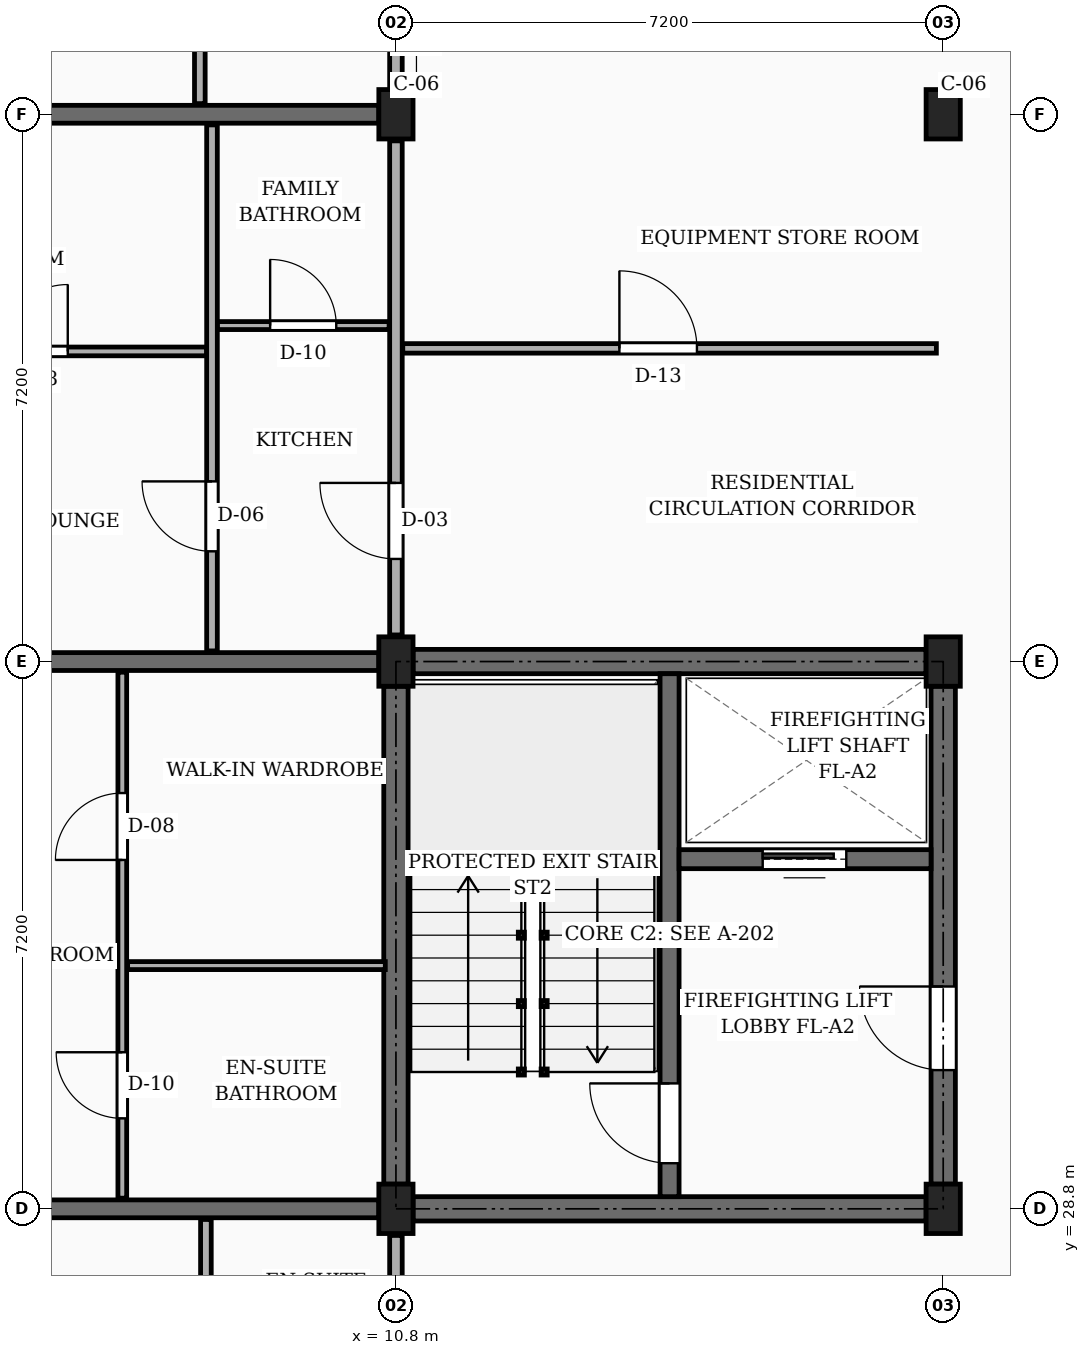
"""IFC4 building model, lengths in metres.
Left out: names, types, materials, properties, quantities, classifications, styles, units other than length and angle.
Written with IfcOpenShell. Run it as: python <this file> out.ifc"""

import sys

from ifc_helpers import new_model, si_unit, direction, frame, frame_2d, origin, origin_2d, place, context, subcontext, project, spatial, rectangle, extrude, element, fill, save


model = new_model("IFC4")
c1 = context("Model", 3, precision=1e-05, world=origin(), true_north=direction((0.0, 1.0)))
c2 = subcontext(c1, "Body", "Model", "MODEL_VIEW")
j1 = project(units=[si_unit("LENGTHUNIT", "METRE"), si_unit("PLANEANGLEUNIT", "RADIAN")], contexts=[c1])
p1 = place(None, origin())
s1 = spatial("IfcSite", under=j1, at=p1, CompositionType="ELEMENT")
p2 = place(p1, origin())
s2 = spatial("IfcBuilding", under=s1, at=p2, CompositionType="ELEMENT")
p3 = place(p2, frame((0.0, 0.0, 20.25)))
s3 = spatial("IfcBuildingStorey", under=s2, at=p3, CompositionType="ELEMENT", Elevation=20.25)
for number, where, z_axis, x_axis in (
    (1, (10.8, 28.8, 0.0), (0.0, 0.0, 1.0), (1.0, 0.0, 0.0)),
    (2, (10.8, 36.0, 0.0), (0.0, 0.0, 1.0), (1.0, 0.0, 0.0)),
    (3, (10.8, 43.2, 0.0), (0.0, 0.0, 1.0), (1.0, 0.0, 0.0)),
    (4, (18.0, 28.8, 0.0), (0.0, 0.0, 1.0), (1.0, 0.0, 0.0)),
    (5, (18.0, 36.0, 0.0), (0.0, 0.0, 1.0), (1.0, 0.0, 0.0)),
    (6, (18.0, 43.2, 0.0), (0.0, 0.0, 1.0), (1.0, 0.0, 0.0)),
):
    element("IfcColumn", number, at=place(p3, frame(where, z_axis=z_axis, x_axis=x_axis)), inside=s3, PredefinedType="COLUMN", context=c2, shape_type="SweptSolid", body=[
        extrude(rectangle(XDim=0.45, YDim=0.65, at=origin_2d()), origin(), (0.0, 0.0, 1.0), 3.15),
    ])
p4 = place(p3, frame((3.875, 28.8, 0.0), z_axis=(0.0, 0.0, 1.0), x_axis=(1.0, 0.0, 0.0)))
e7 = element("IfcWall", 7, at=p4, inside=s3, PredefinedType="SOLIDWALL", context=c2, shape_type="SweptSolid", body=[
    extrude(rectangle(XDim=6.7, YDim=0.235, at=frame_2d((3.35, 0.0))), origin(), (0.0, 0.0, 1.0), 2.17),
])
p5 = place(p4, frame((1.35, 0.0, 0.0)))
e8 = element("IfcOpeningElement", 8, at=p5, cuts=e7, PredefinedType="OPENING", context=c2, shape_type="SweptSolid", body=[
    extrude(rectangle(XDim=0.98, YDim=2.12, at=frame_2d((0.49, 1.06))), frame((0.0, 0.127, 0.0), z_axis=(0.0, -1.0, 0.0), x_axis=(1.0, 0.0, 0.0)), (0.0, 0.0, 1.0), 0.255),
])
for number, where, z_axis, x_axis in (
    (9, (3.875, 36.0, 0.0), (0.0, 0.0, 1.0), (1.0, 0.0, 0.0)),
    (10, (3.875, 43.2, 0.0), (0.0, 0.0, 1.0), (1.0, 0.0, 0.0)),
):
    element("IfcWall", number, at=place(p3, frame(where, z_axis=z_axis, x_axis=x_axis)), inside=s3, PredefinedType="SOLIDWALL", context=c2, shape_type="SweptSolid", body=[
        extrude(rectangle(XDim=6.7, YDim=0.235, at=frame_2d((3.35, 0.0))), origin(), (0.0, 0.0, 1.0), 2.17),
    ])
p6 = place(p3, frame((10.8, 29.125, 0.0), z_axis=(0.0, 0.0, 1.0), x_axis=(0.0, 1.0, 0.0)))
e11 = element("IfcWall", 11, at=p6, inside=s3, PredefinedType="SHEAR", context=c2, shape_type="SweptSolid", body=[
    extrude(rectangle(XDim=6.55, YDim=0.32, at=frame_2d((3.275, 0.0))), origin(), (0.0, 0.0, 1.0), 2.87),
])
p7 = place(p3, frame((11.025, 36.0, 0.0), z_axis=(0.0, 0.0, 1.0), x_axis=(1.0, 0.0, 0.0)))
e12 = element("IfcWall", 12, at=p7, inside=s3, PredefinedType="SHEAR", context=c2, shape_type="SweptSolid", body=[
    extrude(rectangle(XDim=6.75, YDim=0.32, at=frame_2d((3.375, 0.0))), origin(), (0.0, 0.0, 1.0), 2.87),
])
p8 = place(p3, frame((18.0, 29.125, 0.0), z_axis=(0.0, 0.0, 1.0), x_axis=(0.0, 1.0, 0.0)))
e13 = element("IfcWall", 13, at=p8, inside=s3, PredefinedType="SHEAR", context=c2, shape_type="SweptSolid", body=[
    extrude(rectangle(XDim=6.55, YDim=0.32, at=frame_2d((3.275, 0.0))), origin(), (0.0, 0.0, 1.0), 2.87),
])
p9 = place(p8, frame((1.5, 0.0, 0.0)))
e14 = element("IfcOpeningElement", 14, at=p9, cuts=e13, PredefinedType="OPENING", context=c2, shape_type="SweptSolid", body=[
    extrude(rectangle(XDim=1.1, YDim=2.15, at=frame_2d((0.55, 1.075))), frame((0.0, 0.17, 0.0), z_axis=(0.0, -1.0, 0.0), x_axis=(1.0, 0.0, 0.0)), (0.0, 0.0, 1.0), 0.34),
])
p10 = place(p3, frame((11.025, 28.8, 0.0), z_axis=(0.0, 0.0, 1.0), x_axis=(1.0, 0.0, 0.0)))
e15 = element("IfcWall", 15, at=p10, inside=s3, PredefinedType="SHEAR", context=c2, shape_type="SweptSolid", body=[
    extrude(rectangle(XDim=6.75, YDim=0.32, at=frame_2d((3.375, 0.0))), origin(), (0.0, 0.0, 1.0), 2.87),
])
p11 = place(p3, frame((14.4, 28.96, 0.0), z_axis=(0.0, 0.0, 1.0), x_axis=(0.0, 1.0, 0.0)))
e16 = element("IfcWall", 16, at=p11, inside=s3, PredefinedType="SHEAR", context=c2, shape_type="SweptSolid", body=[
    extrude(rectangle(XDim=6.88, YDim=0.25, at=frame_2d((3.44, 0.0))), origin(), (0.0, 0.0, 1.0), 2.87),
])
p12 = place(p11, frame((0.44, 0.0, 0.0)))
e17 = element("IfcOpeningElement", 17, at=p12, cuts=e16, PredefinedType="OPENING", context=c2, shape_type="SweptSolid", body=[
    extrude(rectangle(XDim=1.05, YDim=2.15, at=frame_2d((0.525, 1.075))), frame((0.0, 0.135, 0.0), z_axis=(0.0, -1.0, 0.0), x_axis=(1.0, 0.0, 0.0)), (0.0, 0.0, 1.0), 0.27),
])
p13 = place(p3, frame((14.525, 33.4, 0.0), z_axis=(0.0, 0.0, 1.0), x_axis=(1.0, 0.0, 0.0)))
e18 = element("IfcWall", 18, at=p13, inside=s3, PredefinedType="SHEAR", context=c2, shape_type="SweptSolid", body=[
    extrude(rectangle(XDim=3.315, YDim=0.25, at=frame_2d((1.658, 0.0))), origin(), (0.0, 0.0, 1.0), 2.87),
])
p14 = place(p13, frame((1.1, 0.0, 0.0)))
e19 = element("IfcOpeningElement", 19, at=p14, cuts=e18, PredefinedType="OPENING", context=c2, shape_type="SweptSolid", body=[
    extrude(rectangle(XDim=1.1, YDim=2.2, at=frame_2d((0.55, 1.1))), frame((0.0, 0.135, 0.0), z_axis=(0.0, -1.0, 0.0), x_axis=(1.0, 0.0, 0.0)), (0.0, 0.0, 1.0), 0.27),
])
p15 = place(p3, frame((10.8, 21.95, 0.0), z_axis=(0.0, 0.0, 1.0), x_axis=(0.0, 1.0, 0.0)))
e20 = element("IfcWall", 20, at=p15, inside=s3, PredefinedType="PARTITIONING", context=c2, shape_type="SweptSolid", body=[
    extrude(rectangle(XDim=6.5, YDim=0.165, at=frame_2d((3.25, 0.0))), origin(), (0.0, 0.0, 1.0), 2.305),
])
p16 = place(p15, frame((1.0, 0.0, 0.0)))
e21 = element("IfcOpeningElement", 21, at=p16, cuts=e20, PredefinedType="OPENING", context=c2, shape_type="SweptSolid", body=[
    extrude(rectangle(XDim=1.14, YDim=2.18, at=frame_2d((0.57, 1.09))), frame((0.0, 0.093, 0.0), z_axis=(0.0, -1.0, 0.0), x_axis=(1.0, 0.0, 0.0)), (0.0, 0.0, 1.0), 0.185),
])
p17 = place(p3, frame((10.8, 36.35, 0.0), z_axis=(0.0, 0.0, 1.0), x_axis=(0.0, 1.0, 0.0)))
e22 = element("IfcWall", 22, at=p17, inside=s3, PredefinedType="PARTITIONING", context=c2, shape_type="SweptSolid", body=[
    extrude(rectangle(XDim=6.5, YDim=0.165, at=frame_2d((3.25, 0.0))), origin(), (0.0, 0.0, 1.0), 2.305),
])
p18 = place(p17, frame((1.0, 0.0, 0.0)))
e23 = element("IfcOpeningElement", 23, at=p18, cuts=e22, PredefinedType="OPENING", context=c2, shape_type="SweptSolid", body=[
    extrude(rectangle(XDim=1.0, YDim=2.15, at=frame_2d((0.5, 1.075))), frame((0.0, 0.093, 0.0), z_axis=(0.0, -1.0, 0.0), x_axis=(1.0, 0.0, 0.0)), (0.0, 0.0, 1.0), 0.185),
])
p19 = place(p3, frame((10.8, 43.55, 0.0), z_axis=(0.0, 0.0, 1.0), x_axis=(0.0, 1.0, 0.0)))
e24 = element("IfcWall", 24, at=p19, inside=s3, PredefinedType="PARTITIONING", context=c2, shape_type="SweptSolid", body=[
    extrude(rectangle(XDim=6.5, YDim=0.165, at=frame_2d((3.25, 0.0))), origin(), (0.0, 0.0, 1.0), 2.305),
])
p20 = place(p19, frame((1.0, 0.0, 0.0)))
e25 = element("IfcOpeningElement", 25, at=p20, cuts=e24, PredefinedType="OPENING", context=c2, shape_type="SweptSolid", body=[
    extrude(rectangle(XDim=0.94, YDim=2.12, at=frame_2d((0.47, 1.06))), frame((0.0, 0.093, 0.0), z_axis=(0.0, -1.0, 0.0), x_axis=(1.0, 0.0, 0.0)), (0.0, 0.0, 1.0), 0.185),
])
p21 = place(p3, frame((8.3, 21.74, 0.0), z_axis=(0.0, 0.0, 1.0), x_axis=(0.0, 1.0, 0.0)))
e26 = element("IfcWall", 26, at=p21, inside=s3, PredefinedType="PARTITIONING", context=c2, shape_type="SweptSolid", body=[
    extrude(rectangle(XDim=6.92, YDim=0.14, at=frame_2d((3.46, 0.0))), origin(), (0.0, 0.0, 1.0), 2.305),
])
p22 = place(p21, frame((1.31, 0.0, 0.0)))
e27 = element("IfcOpeningElement", 27, at=p22, cuts=e26, PredefinedType="OPENING", context=c2, shape_type="SweptSolid", body=[
    extrude(rectangle(XDim=0.95, YDim=2.1, at=frame_2d((0.475, 1.05))), frame((0.0, 0.08, 0.0), z_axis=(0.0, -1.0, 0.0), x_axis=(1.0, 0.0, 0.0)), (0.0, 0.0, 1.0), 0.16),
])
p23 = place(p3, frame((7.2, 28.94, 0.0), z_axis=(0.0, 0.0, 1.0), x_axis=(0.0, 1.0, 0.0)))
e28 = element("IfcWall", 28, at=p23, inside=s3, PredefinedType="PARTITIONING", context=c2, shape_type="SweptSolid", body=[
    extrude(rectangle(XDim=6.92, YDim=0.115, at=frame_2d((3.46, 0.0))), origin(), (0.0, 0.0, 1.0), 2.305),
])
p24 = place(p23, frame((1.05, 0.0, 0.0)))
e29 = element("IfcOpeningElement", 29, at=p24, cuts=e28, PredefinedType="OPENING", context=c2, shape_type="SweptSolid", body=[
    extrude(rectangle(XDim=0.87, YDim=2.05, at=frame_2d((0.435, 1.025))), frame((0.0, 0.067, 0.0), z_axis=(0.0, -1.0, 0.0), x_axis=(1.0, 0.0, 0.0)), (0.0, 0.0, 1.0), 0.135),
])
p25 = place(p23, frame((4.45, 0.0, 0.0)))
e30 = element("IfcOpeningElement", 30, at=p25, cuts=e28, PredefinedType="OPENING", context=c2, shape_type="SweptSolid", body=[
    extrude(rectangle(XDim=0.88, YDim=2.08, at=frame_2d((0.44, 1.04))), frame((0.0, 0.067, 0.0), z_axis=(0.0, -1.0, 0.0), x_axis=(1.0, 0.0, 0.0)), (0.0, 0.0, 1.0), 0.135),
])
p26 = place(p3, frame((7.27, 32.0, 0.0), z_axis=(0.0, 0.0, 1.0), x_axis=(1.0, 0.0, 0.0)))
e31 = element("IfcWall", 31, at=p26, inside=s3, PredefinedType="PARTITIONING", context=c2, shape_type="SweptSolid", body=[
    extrude(rectangle(XDim=3.39, YDim=0.105, at=frame_2d((1.695, 0.0))), origin(), (0.0, 0.0, 1.0), 2.305),
])
p27 = place(p3, frame((10.89, 40.12, 0.0), z_axis=(0.0, 0.0, 1.0), x_axis=(1.0, 0.0, 0.0)))
e32 = element("IfcWall", 32, at=p27, inside=s3, PredefinedType="PARTITIONING", context=c2, shape_type="SweptSolid", body=[
    extrude(rectangle(XDim=7.02, YDim=0.125, at=frame_2d((3.51, 0.0))), origin(), (0.0, 0.0, 1.0), 2.305),
])
p28 = place(p27, frame((2.85, 0.0, 0.0)))
e33 = element("IfcOpeningElement", 33, at=p28, cuts=e32, PredefinedType="OPENING", context=c2, shape_type="SweptSolid", body=[
    extrude(rectangle(XDim=1.02, YDim=2.15, at=frame_2d((0.51, 1.075))), frame((0.0, 0.073, 0.0), z_axis=(0.0, -1.0, 0.0), x_axis=(1.0, 0.0, 0.0)), (0.0, 0.0, 1.0), 0.145),
])
p29 = place(p3, frame((3.775, 40.08, 0.0), z_axis=(0.0, 0.0, 1.0), x_axis=(1.0, 0.0, 0.0)))
e34 = element("IfcWall", 34, at=p29, inside=s3, PredefinedType="PARTITIONING", context=c2, shape_type="SweptSolid", body=[
    extrude(rectangle(XDim=4.535, YDim=0.115, at=frame_2d((2.268, 0.0))), origin(), (0.0, 0.0, 1.0), 2.305),
])
p30 = place(p29, frame((1.827, 0.0, 0.0)))
e35 = element("IfcOpeningElement", 35, at=p30, cuts=e34, PredefinedType="OPENING", context=c2, shape_type="SweptSolid", body=[
    extrude(rectangle(XDim=0.88, YDim=2.08, at=frame_2d((0.44, 1.04))), frame((0.0, 0.067, 0.0), z_axis=(0.0, -1.0, 0.0), x_axis=(1.0, 0.0, 0.0)), (0.0, 0.0, 1.0), 0.135),
])
p31 = place(p3, frame((8.45, 40.42, 0.0), z_axis=(0.0, 0.0, 1.0), x_axis=(1.0, 0.0, 0.0)))
e36 = element("IfcWall", 36, at=p31, inside=s3, PredefinedType="PARTITIONING", context=c2, shape_type="SweptSolid", body=[
    extrude(rectangle(XDim=2.26, YDim=0.105, at=frame_2d((1.13, 0.0))), origin(), (0.0, 0.0, 1.0), 2.305),
])
p32 = place(p31, frame((0.695, 0.0, 0.0)))
e37 = element("IfcOpeningElement", 37, at=p32, cuts=e36, PredefinedType="OPENING", context=c2, shape_type="SweptSolid", body=[
    extrude(rectangle(XDim=0.87, YDim=2.05, at=frame_2d((0.435, 1.025))), frame((0.0, 0.062, 0.0), z_axis=(0.0, -1.0, 0.0), x_axis=(1.0, 0.0, 0.0)), (0.0, 0.0, 1.0), 0.125),
])
p33 = place(p3, frame((8.38, 36.14, 0.0), z_axis=(0.0, 0.0, 1.0), x_axis=(0.0, 1.0, 0.0)))
e38 = element("IfcWall", 38, at=p33, inside=s3, PredefinedType="PARTITIONING", context=c2, shape_type="SweptSolid", body=[
    extrude(rectangle(XDim=6.92, YDim=0.14, at=frame_2d((3.46, 0.0))), origin(), (0.0, 0.0, 1.0), 2.305),
])
p34 = place(p33, frame((1.31, 0.0, 0.0)))
e39 = element("IfcOpeningElement", 39, at=p34, cuts=e38, PredefinedType="OPENING", context=c2, shape_type="SweptSolid", body=[
    extrude(rectangle(XDim=0.92, YDim=2.1, at=frame_2d((0.46, 1.05))), frame((0.0, 0.08, 0.0), z_axis=(0.0, -1.0, 0.0), x_axis=(1.0, 0.0, 0.0)), (0.0, 0.0, 1.0), 0.16),
])
p35 = place(p3, frame((8.22, 43.34, 0.0), z_axis=(0.0, 0.0, 1.0), x_axis=(0.0, 1.0, 0.0)))
e40 = element("IfcWall", 40, at=p35, inside=s3, PredefinedType="PARTITIONING", context=c2, shape_type="SweptSolid", body=[
    extrude(rectangle(XDim=6.885, YDim=0.14, at=frame_2d((3.442, 0.0))), origin(), (0.0, 0.0, 1.0), 2.305),
])
p36 = place(p35, frame((1.31, 0.0, 0.0)))
e41 = element("IfcOpeningElement", 41, at=p36, cuts=e40, PredefinedType="OPENING", context=c2, shape_type="SweptSolid", body=[
    extrude(rectangle(XDim=0.95, YDim=2.1, at=frame_2d((0.475, 1.05))), frame((0.0, 0.08, 0.0), z_axis=(0.0, -1.0, 0.0), x_axis=(1.0, 0.0, 0.0)), (0.0, 0.0, 1.0), 0.16),
])
p37 = place(p9, frame((1.1, 0.0, 0.0), z_axis=(0.0, 0.0, 1.0), x_axis=(-1.0, 0.0, 0.0)))
e42 = element("IfcDoor", 42, at=p37, inside=s3, OperationType="SINGLE_SWING_RIGHT", PredefinedType="DOOR", context=c2, shape_type="SweptSolid", body=[
    extrude(rectangle(XDim=1.1, YDim=2.15, at=frame_2d((0.55, 1.075))), frame((0.0, 0.025, 0.0), z_axis=(0.0, -1.0, 0.0), x_axis=(1.0, 0.0, 0.0)), (0.0, 0.0, 1.0), 0.05),
])
fill(e14, e42)
p38 = place(p12, origin())
e43 = element("IfcDoor", 43, at=p38, inside=s3, OperationType="SINGLE_SWING_RIGHT", PredefinedType="DOOR", context=c2, shape_type="SweptSolid", body=[
    extrude(rectangle(XDim=1.05, YDim=2.15, at=frame_2d((0.525, 1.075))), frame((0.0, 0.025, 0.0), z_axis=(0.0, -1.0, 0.0), x_axis=(1.0, 0.0, 0.0)), (0.0, 0.0, 1.0), 0.05),
])
fill(e17, e43)
p39 = place(p14, origin())
e44 = element("IfcDoor", 44, at=p39, inside=s3, OperationType="SLIDING_TO_LEFT", PredefinedType="DOOR", context=c2, shape_type="SweptSolid", body=[
    extrude(rectangle(XDim=1.1, YDim=2.2, at=frame_2d((0.55, 1.1))), frame((0.0, 0.025, 0.0), z_axis=(0.0, -1.0, 0.0), x_axis=(1.0, 0.0, 0.0)), (0.0, 0.0, 1.0), 0.05),
])
fill(e19, e44)
p40 = place(p18, origin())
e45 = element("IfcDoor", 45, at=p40, inside=s3, OperationType="SINGLE_SWING_RIGHT", PredefinedType="DOOR", context=c2, shape_type="SweptSolid", body=[
    extrude(rectangle(XDim=1.0, YDim=2.15, at=frame_2d((0.5, 1.075))), frame((0.0, 0.025, 0.0), z_axis=(0.0, -1.0, 0.0), x_axis=(1.0, 0.0, 0.0)), (0.0, 0.0, 1.0), 0.05),
])
fill(e23, e45)
p41 = place(p24, origin())
e46 = element("IfcDoor", 46, at=p41, inside=s3, OperationType="SINGLE_SWING_RIGHT", PredefinedType="DOOR", context=c2, shape_type="SweptSolid", body=[
    extrude(rectangle(XDim=0.87, YDim=2.05, at=frame_2d((0.435, 1.025))), frame((0.0, 0.025, 0.0), z_axis=(0.0, -1.0, 0.0), x_axis=(1.0, 0.0, 0.0)), (0.0, 0.0, 1.0), 0.05),
])
fill(e29, e46)
p42 = place(p25, origin())
e47 = element("IfcDoor", 47, at=p42, inside=s3, OperationType="SINGLE_SWING_LEFT", PredefinedType="DOOR", context=c2, shape_type="SweptSolid", body=[
    extrude(rectangle(XDim=0.88, YDim=2.08, at=frame_2d((0.44, 1.04))), frame((0.0, 0.025, 0.0), z_axis=(0.0, -1.0, 0.0), x_axis=(1.0, 0.0, 0.0)), (0.0, 0.0, 1.0), 0.05),
])
fill(e30, e47)
p43 = place(p28, origin())
e48 = element("IfcDoor", 48, at=p43, inside=s3, OperationType="SINGLE_SWING_LEFT", PredefinedType="DOOR", context=c2, shape_type="SweptSolid", body=[
    extrude(rectangle(XDim=1.02, YDim=2.15, at=frame_2d((0.51, 1.075))), frame((0.0, 0.025, 0.0), z_axis=(0.0, -1.0, 0.0), x_axis=(1.0, 0.0, 0.0)), (0.0, 0.0, 1.0), 0.05),
])
fill(e33, e48)
p44 = place(p30, origin())
e49 = element("IfcDoor", 49, at=p44, inside=s3, OperationType="SINGLE_SWING_RIGHT", PredefinedType="DOOR", context=c2, shape_type="SweptSolid", body=[
    extrude(rectangle(XDim=0.88, YDim=2.08, at=frame_2d((0.44, 1.04))), frame((0.0, 0.025, 0.0), z_axis=(0.0, -1.0, 0.0), x_axis=(1.0, 0.0, 0.0)), (0.0, 0.0, 1.0), 0.05),
])
fill(e35, e49)
p45 = place(p32, origin())
e50 = element("IfcDoor", 50, at=p45, inside=s3, OperationType="SINGLE_SWING_LEFT", PredefinedType="DOOR", context=c2, shape_type="SweptSolid", body=[
    extrude(rectangle(XDim=0.87, YDim=2.05, at=frame_2d((0.435, 1.025))), frame((0.0, 0.025, 0.0), z_axis=(0.0, -1.0, 0.0), x_axis=(1.0, 0.0, 0.0)), (0.0, 0.0, 1.0), 0.05),
])
fill(e37, e50)
p46 = place(p34, origin())
e51 = element("IfcDoor", 51, at=p46, inside=s3, OperationType="SINGLE_SWING_RIGHT", PredefinedType="DOOR", context=c2, shape_type="SweptSolid", body=[
    extrude(rectangle(XDim=0.92, YDim=2.1, at=frame_2d((0.46, 1.05))), frame((0.0, 0.025, 0.0), z_axis=(0.0, -1.0, 0.0), x_axis=(1.0, 0.0, 0.0)), (0.0, 0.0, 1.0), 0.05),
])
fill(e39, e51)
save(model, sys.argv[1])
